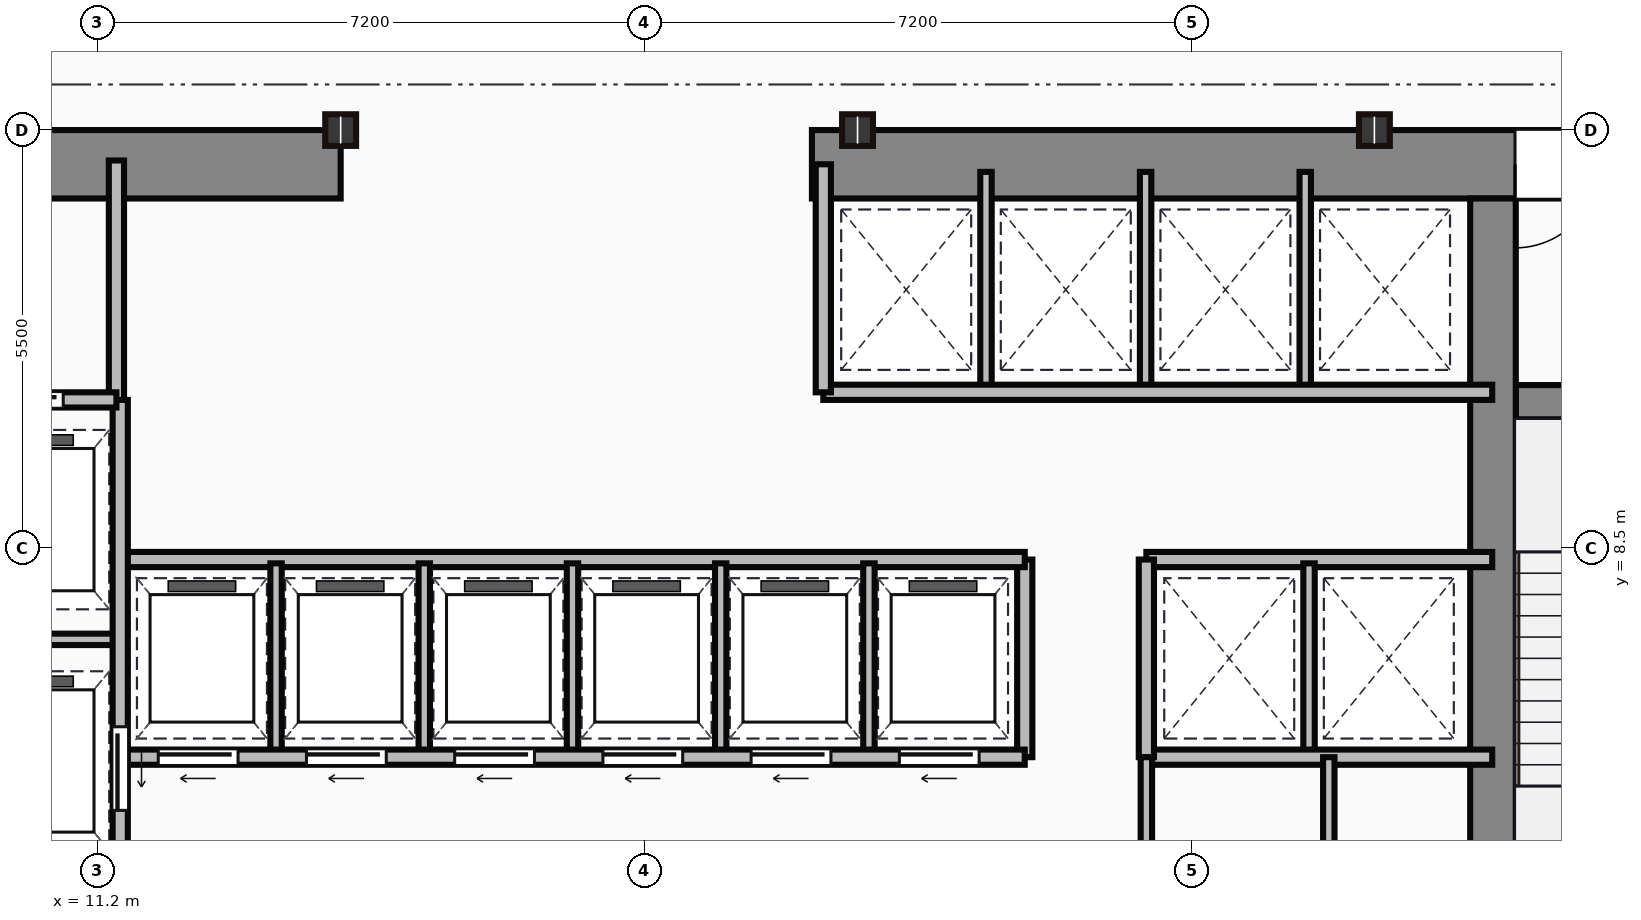
"""IFC4 building model, lengths in metres.
Left out: names, types, materials, properties, quantities, classifications, styles, units other than length and angle.
Written with IfcOpenShell. Run it as: python <this file> out.ifc"""

import sys

from ifc_helpers import new_model, si_unit, direction, frame, frame_2d, origin, origin_2d, place, context, subcontext, project, spatial, rectangle, i_section, extrude, source, transform, mapped, element, fill, save


model = new_model("IFC4")
c1 = context("Model", 3, precision=1e-05, world=origin(), true_north=direction((0.0, 1.0)))
c2 = subcontext(c1, "Body", "Model", "MODEL_VIEW")
j1 = project(units=[si_unit("LENGTHUNIT", "METRE"), si_unit("PLANEANGLEUNIT", "RADIAN")], contexts=[c1])
p1 = place(None, origin())
s1 = spatial("IfcSite", under=j1, at=p1, CompositionType="ELEMENT")
p2 = place(p1, origin())
s2 = spatial("IfcBuilding", under=s1, at=p2, CompositionType="ELEMENT")
p3 = place(p2, frame((0.0, 0.0, 79.95)))
s3 = spatial("IfcBuildingStorey", under=s2, at=p3, CompositionType="ELEMENT", Elevation=79.95)
m1 = source(origin(), c2, "Body", "SweptSolid", [
    extrude(rectangle(XDim=9.1, YDim=0.9, at=frame_2d((4.55, 0.0))), origin(), (0.0, 0.0, 1.0), 4.2),
])
p4 = place(p3, frame((5.3, 13.55, 0.0), z_axis=(0.0, 0.0, 1.0), x_axis=(1.0, 0.0, 0.0)))
e1 = element("IfcWall", 1, at=p4, inside=s3, PredefinedType="SHEAR", context=c2, shape_type="MappedRepresentation", body=[
    mapped(m1, transform((0.0, 0.0, 0.0))),
])
p5 = place(p4, frame((4.1, 0.0, 0.0)))
e2 = element("IfcOpeningElement", 2, at=p5, cuts=e1, PredefinedType="OPENING", context=c2, shape_type="SweptSolid", body=[
    extrude(rectangle(XDim=1.1, YDim=2.15, at=frame_2d((0.55, 1.075))), frame((0.0, 0.46, 0.0), z_axis=(0.0, -1.0, 0.0), x_axis=(1.0, 0.0, 0.0)), (0.0, 0.0, 1.0), 0.92),
])
m2 = source(origin(), c2, "Body", "SweptSolid", [
    extrude(rectangle(XDim=12.6, YDim=0.9, at=frame_2d((6.3, 0.0))), origin(), (0.0, 0.0, 1.0), 4.2),
])
p6 = place(p3, frame((20.6, 13.55, 0.0), z_axis=(0.0, 0.0, 1.0), x_axis=(1.0, 0.0, 0.0)))
e3 = element("IfcWall", 3, at=p6, inside=s3, PredefinedType="SHEAR", context=c2, shape_type="MappedRepresentation", body=[
    mapped(m2, transform((0.0, 0.0, 0.0))),
])
p7 = place(p6, frame((9.25, 0.0, 0.0)))
e4 = element("IfcOpeningElement", 4, at=p7, cuts=e3, PredefinedType="OPENING", context=c2, shape_type="SweptSolid", body=[
    extrude(rectangle(XDim=1.1, YDim=2.15, at=frame_2d((0.55, 1.075))), frame((0.0, 0.46, 0.0), z_axis=(0.0, -1.0, 0.0), x_axis=(1.0, 0.0, 0.0)), (0.0, 0.0, 1.0), 0.92),
])
m3 = source(origin(), c2, "Body", "SweptSolid", [
    extrude(rectangle(XDim=12.2, YDim=0.6, at=frame_2d((6.1, 0.0))), origin(), (0.0, 0.0, 1.0), 4.2),
])
p8 = place(p3, frame((29.56, 0.9, 0.0), z_axis=(0.0, 0.0, 1.0), x_axis=(0.0, 1.0, 0.0)))
e5 = element("IfcWall", 5, at=p8, inside=s3, PredefinedType="SHEAR", context=c2, shape_type="MappedRepresentation", body=[
    mapped(m3, transform((0.0, 0.0, 0.0))),
])
m4 = source(origin(), c2, "Body", "SweptSolid", [
    extrude(rectangle(XDim=3.39, YDim=0.45, at=frame_2d((1.695, 0.0))), origin(), (0.0, 0.0, 1.0), 4.2),
])
p9 = place(p3, frame((29.86, 10.42, 0.0), z_axis=(0.0, 0.0, 1.0), x_axis=(1.0, 0.0, 0.0)))
e6 = element("IfcWall", 6, at=p9, inside=s3, PredefinedType="SHEAR", context=c2, shape_type="MappedRepresentation", body=[
    mapped(m4, transform((0.0, 0.0, 0.0))),
])
p10 = place(p9, frame((1.1, 0.0, 0.0)))
e7 = element("IfcOpeningElement", 7, at=p10, cuts=e6, PredefinedType="OPENING", context=c2, shape_type="SweptSolid", body=[
    extrude(rectangle(XDim=1.1, YDim=2.15, at=frame_2d((0.55, 1.075))), frame((0.0, 0.235, 0.0), z_axis=(0.0, -1.0, 0.0), x_axis=(1.0, 0.0, 0.0)), (0.0, 0.0, 1.0), 0.47),
])
m5 = source(origin(), c2, "Body", "SweptSolid", [
    extrude(i_section(OverallWidth=0.406, OverallDepth=0.416, WebThickness=0.03, FlangeThickness=0.048, at=origin_2d()), origin(), (0.0, 0.0, 1.0), 4.2),
])
for number, where, z_axis, x_axis in (
    (8, (14.4, 14.0, 0.0), (0.0, 0.0, 1.0), (1.0, 0.0, 0.0)),
    (9, (21.2, 14.0, 0.0), (0.0, 0.0, 1.0), (1.0, 0.0, 0.0)),
    (10, (28.0, 14.0, 0.0), (0.0, 0.0, 1.0), (1.0, 0.0, 0.0)),
):
    element("IfcColumn", number, at=place(p3, frame(where, z_axis=z_axis, x_axis=x_axis)), inside=s3, PredefinedType="COLUMN", context=c2, shape_type="MappedRepresentation", body=[
        mapped(m5, transform((0.0, 0.0, 0.0))),
    ])
m6 = source(origin(), c2, "Body", "SweptSolid", [
    extrude(rectangle(XDim=3.18, YDim=0.2, at=frame_2d((1.59, 0.0))), origin(), (0.0, 0.0, 1.0), 3.9),
])
p11 = place(p3, frame((11.45, 10.42, 0.0), z_axis=(0.0, 0.0, 1.0), x_axis=(0.0, 1.0, 0.0)))
e11 = element("IfcWall", 11, at=p11, inside=s3, PredefinedType="PARTITIONING", context=c2, shape_type="MappedRepresentation", body=[
    mapped(m6, transform((0.0, 0.0, 0.0))),
])
m7 = source(origin(), c2, "Body", "SweptSolid", [
    extrude(rectangle(XDim=2.35, YDim=0.2, at=frame_2d((1.175, 0.0))), origin(), (0.0, 0.0, 1.0), 3.9),
])
p12 = place(p3, frame((9.1, 10.45, 0.0), z_axis=(0.0, 0.0, 1.0), x_axis=(1.0, 0.0, 0.0)))
e12 = element("IfcWall", 12, at=p12, inside=s3, PredefinedType="PARTITIONING", context=c2, shape_type="MappedRepresentation", body=[
    mapped(m7, transform((0.0, 0.0, 0.0))),
])
p13 = place(p12, frame((0.55, 0.0, 0.0)))
e13 = element("IfcOpeningElement", 13, at=p13, cuts=e12, PredefinedType="OPENING", context=c2, shape_type="SweptSolid", body=[
    extrude(rectangle(XDim=1.1, YDim=2.15, at=frame_2d((0.55, 1.075))), frame((0.0, 0.11, 0.0), z_axis=(0.0, -1.0, 0.0), x_axis=(1.0, 0.0, 0.0)), (0.0, 0.0, 1.0), 0.22),
])
m8 = source(origin(), c2, "Body", "SweptSolid", [
    extrude(rectangle(XDim=9.6, YDim=0.2, at=frame_2d((4.8, 0.0))), origin(), (0.0, 0.0, 1.0), 3.9),
])
p14 = place(p3, frame((11.5, 0.85, 0.0), z_axis=(0.0, 0.0, 1.0), x_axis=(0.0, 1.0, 0.0)))
e14 = element("IfcWall", 14, at=p14, inside=s3, PredefinedType="PARTITIONING", context=c2, shape_type="MappedRepresentation", body=[
    mapped(m8, transform((0.0, 0.0, 0.0))),
])
p15 = place(p14, frame((4.2, 0.0, 0.0)))
e15 = element("IfcOpeningElement", 15, at=p15, cuts=e14, PredefinedType="OPENING", context=c2, shape_type="SweptSolid", body=[
    extrude(rectangle(XDim=1.1, YDim=2.15, at=frame_2d((0.55, 1.075))), frame((0.0, 0.11, 0.0), z_axis=(0.0, -1.0, 0.0), x_axis=(1.0, 0.0, 0.0)), (0.0, 0.0, 1.0), 0.22),
])
p16 = place(p14, frame((0.9, 0.0, 0.0)))
e16 = element("IfcOpeningElement", 16, at=p16, cuts=e14, PredefinedType="OPENING", context=c2, shape_type="SweptSolid", body=[
    extrude(rectangle(XDim=1.2, YDim=2.15, at=frame_2d((0.6, 1.075))), frame((0.0, 0.11, 0.0), z_axis=(0.0, -1.0, 0.0), x_axis=(1.0, 0.0, 0.0)), (0.0, 0.0, 1.0), 0.22),
])
m9 = source(origin(), c2, "Body", "SweptSolid", [
    extrude(rectangle(XDim=2.4, YDim=0.15, at=frame_2d((1.2, 0.0))), origin(), (0.0, 0.0, 1.0), 3.9),
])
p17 = place(p3, frame((9.1, 7.3, 0.0), z_axis=(0.0, 0.0, 1.0), x_axis=(1.0, 0.0, 0.0)))
e17 = element("IfcWall", 17, at=p17, inside=s3, PredefinedType="PARTITIONING", context=c2, shape_type="MappedRepresentation", body=[
    mapped(m9, transform((0.0, 0.0, 0.0))),
])
m10 = source(origin(), c2, "Body", "SweptSolid", [
    extrude(rectangle(XDim=11.85, YDim=0.2, at=frame_2d((5.925, 0.0))), origin(), (0.0, 0.0, 1.0), 3.9),
])
p18 = place(p3, frame((11.55, 5.75, 0.0), z_axis=(0.0, 0.0, 1.0), x_axis=(1.0, 0.0, 0.0)))
e18 = element("IfcWall", 18, at=p18, inside=s3, PredefinedType="PARTITIONING", context=c2, shape_type="MappedRepresentation", body=[
    mapped(m10, transform((0.0, 0.0, 0.0))),
])
p19 = place(p18, frame((0.45, 0.0, 0.0)))
e19 = element("IfcOpeningElement", 19, at=p19, cuts=e18, PredefinedType="OPENING", context=c2, shape_type="SweptSolid", body=[
    extrude(rectangle(XDim=1.05, YDim=2.15, at=frame_2d((0.525, 1.075))), frame((0.0, 0.11, 0.0), z_axis=(0.0, -1.0, 0.0), x_axis=(1.0, 0.0, 0.0)), (0.0, 0.0, 1.0), 0.22),
])
p20 = place(p18, frame((2.4, 0.0, 0.0)))
e20 = element("IfcOpeningElement", 20, at=p20, cuts=e18, PredefinedType="OPENING", context=c2, shape_type="SweptSolid", body=[
    extrude(rectangle(XDim=1.05, YDim=2.15, at=frame_2d((0.525, 1.075))), frame((0.0, 0.11, 0.0), z_axis=(0.0, -1.0, 0.0), x_axis=(1.0, 0.0, 0.0)), (0.0, 0.0, 1.0), 0.22),
])
p21 = place(p18, frame((4.35, 0.0, 0.0)))
e21 = element("IfcOpeningElement", 21, at=p21, cuts=e18, PredefinedType="OPENING", context=c2, shape_type="SweptSolid", body=[
    extrude(rectangle(XDim=1.05, YDim=2.15, at=frame_2d((0.525, 1.075))), frame((0.0, 0.11, 0.0), z_axis=(0.0, -1.0, 0.0), x_axis=(1.0, 0.0, 0.0)), (0.0, 0.0, 1.0), 0.22),
])
p22 = place(p18, frame((6.3, 0.0, 0.0)))
e22 = element("IfcOpeningElement", 22, at=p22, cuts=e18, PredefinedType="OPENING", context=c2, shape_type="SweptSolid", body=[
    extrude(rectangle(XDim=1.05, YDim=2.15, at=frame_2d((0.525, 1.075))), frame((0.0, 0.11, 0.0), z_axis=(0.0, -1.0, 0.0), x_axis=(1.0, 0.0, 0.0)), (0.0, 0.0, 1.0), 0.22),
])
p23 = place(p18, frame((8.25, 0.0, 0.0)))
e23 = element("IfcOpeningElement", 23, at=p23, cuts=e18, PredefinedType="OPENING", context=c2, shape_type="SweptSolid", body=[
    extrude(rectangle(XDim=1.05, YDim=2.15, at=frame_2d((0.525, 1.075))), frame((0.0, 0.11, 0.0), z_axis=(0.0, -1.0, 0.0), x_axis=(1.0, 0.0, 0.0)), (0.0, 0.0, 1.0), 0.22),
])
p24 = place(p18, frame((10.2, 0.0, 0.0)))
e24 = element("IfcOpeningElement", 24, at=p24, cuts=e18, PredefinedType="OPENING", context=c2, shape_type="SweptSolid", body=[
    extrude(rectangle(XDim=1.05, YDim=2.15, at=frame_2d((0.525, 1.075))), frame((0.0, 0.11, 0.0), z_axis=(0.0, -1.0, 0.0), x_axis=(1.0, 0.0, 0.0)), (0.0, 0.0, 1.0), 0.22),
])
p25 = place(p3, frame((11.55, 8.35, 0.0), z_axis=(0.0, 0.0, 1.0), x_axis=(1.0, 0.0, 0.0)))
e25 = element("IfcWall", 25, at=p25, inside=s3, PredefinedType="PARTITIONING", context=c2, shape_type="MappedRepresentation", body=[
    mapped(m10, transform((0.0, 0.0, 0.0))),
])
m11 = source(origin(), c2, "Body", "SweptSolid", [
    extrude(rectangle(XDim=2.6, YDim=0.2, at=frame_2d((1.3, 0.0))), origin(), (0.0, 0.0, 1.0), 3.9),
])
p26 = place(p3, frame((23.4, 5.75, 0.0), z_axis=(0.0, 0.0, 1.0), x_axis=(0.0, 1.0, 0.0)))
e26 = element("IfcWall", 26, at=p26, inside=s3, PredefinedType="PARTITIONING", context=c2, shape_type="MappedRepresentation", body=[
    mapped(m11, transform((0.0, 0.0, 0.0))),
])
m12 = source(origin(), c2, "Body", "SweptSolid", [
    extrude(rectangle(XDim=2.5, YDim=0.15, at=frame_2d((1.25, 0.0))), origin(), (0.0, 0.0, 1.0), 3.9),
])
for number, where, z_axis, x_axis in (
    (27, (13.55, 5.8, 0.0), (0.0, 0.0, 1.0), (0.0, 1.0, 0.0)),
    (28, (15.5, 5.8, 0.0), (0.0, 0.0, 1.0), (0.0, 1.0, 0.0)),
    (29, (17.45, 5.8, 0.0), (0.0, 0.0, 1.0), (0.0, 1.0, 0.0)),
    (30, (19.4, 5.8, 0.0), (0.0, 0.0, 1.0), (0.0, 1.0, 0.0)),
    (31, (21.35, 5.8, 0.0), (0.0, 0.0, 1.0), (0.0, 1.0, 0.0)),
):
    element("IfcWall", number, at=place(p3, frame(where, z_axis=z_axis, x_axis=x_axis)), inside=s3, PredefinedType="PARTITIONING", context=c2, shape_type="MappedRepresentation", body=[
        mapped(m12, transform((0.0, 0.0, 0.0))),
    ])
m13 = source(origin(), c2, "Body", "SweptSolid", [
    extrude(rectangle(XDim=8.8, YDim=0.2, at=frame_2d((4.4, 0.0))), origin(), (0.0, 0.0, 1.0), 3.9),
])
p27 = place(p3, frame((20.75, 10.55, 0.0), z_axis=(0.0, 0.0, 1.0), x_axis=(1.0, 0.0, 0.0)))
e32 = element("IfcWall", 32, at=p27, inside=s3, PredefinedType="PARTITIONING", context=c2, shape_type="MappedRepresentation", body=[
    mapped(m13, transform((0.0, 0.0, 0.0))),
])
m14 = source(origin(), c2, "Body", "SweptSolid", [
    extrude(rectangle(XDim=3.0, YDim=0.2, at=frame_2d((1.5, 0.0))), origin(), (0.0, 0.0, 1.0), 3.9),
])
p28 = place(p3, frame((20.75, 10.55, 0.0), z_axis=(0.0, 0.0, 1.0), x_axis=(0.0, 1.0, 0.0)))
e33 = element("IfcWall", 33, at=p28, inside=s3, PredefinedType="PARTITIONING", context=c2, shape_type="MappedRepresentation", body=[
    mapped(m14, transform((0.0, 0.0, 0.0))),
])
m15 = source(origin(), c2, "Body", "SweptSolid", [
    extrude(rectangle(XDim=2.85, YDim=0.15, at=frame_2d((1.425, 0.0))), origin(), (0.0, 0.0, 1.0), 3.9),
])
for number, where, z_axis, x_axis in (
    (34, (22.89, 10.6, 0.0), (0.0, 0.0, 1.0), (0.0, 1.0, 0.0)),
    (35, (24.99, 10.6, 0.0), (0.0, 0.0, 1.0), (0.0, 1.0, 0.0)),
    (36, (27.09, 10.6, 0.0), (0.0, 0.0, 1.0), (0.0, 1.0, 0.0)),
):
    element("IfcWall", number, at=place(p3, frame(where, z_axis=z_axis, x_axis=x_axis)), inside=s3, PredefinedType="PARTITIONING", context=c2, shape_type="MappedRepresentation", body=[
        mapped(m15, transform((0.0, 0.0, 0.0))),
    ])
m16 = source(origin(), c2, "Body", "SweptSolid", [
    extrude(rectangle(XDim=4.55, YDim=0.2, at=frame_2d((2.275, 0.0))), origin(), (0.0, 0.0, 1.0), 3.9),
])
for number, where, z_axis, x_axis in (
    (37, (25.0, 8.35, 0.0), (0.0, 0.0, 1.0), (1.0, 0.0, 0.0)),
    (38, (25.0, 5.75, 0.0), (0.0, 0.0, 1.0), (1.0, 0.0, 0.0)),
):
    element("IfcWall", number, at=place(p3, frame(where, z_axis=z_axis, x_axis=x_axis)), inside=s3, PredefinedType="PARTITIONING", context=c2, shape_type="MappedRepresentation", body=[
        mapped(m16, transform((0.0, 0.0, 0.0))),
    ])
p29 = place(p3, frame((25.0, 5.75, 0.0), z_axis=(0.0, 0.0, 1.0), x_axis=(0.0, 1.0, 0.0)))
e39 = element("IfcWall", 39, at=p29, inside=s3, PredefinedType="PARTITIONING", context=c2, shape_type="MappedRepresentation", body=[
    mapped(m11, transform((0.0, 0.0, 0.0))),
])
p30 = place(p3, frame((27.14, 5.8, 0.0), z_axis=(0.0, 0.0, 1.0), x_axis=(0.0, 1.0, 0.0)))
e40 = element("IfcWall", 40, at=p30, inside=s3, PredefinedType="PARTITIONING", context=c2, shape_type="MappedRepresentation", body=[
    mapped(m12, transform((0.0, 0.0, 0.0))),
])
m17 = source(origin(), c2, "Body", "SweptSolid", [
    extrude(rectangle(XDim=4.9, YDim=0.15, at=frame_2d((2.45, 0.0))), origin(), (0.0, 0.0, 1.0), 3.9),
])
p31 = place(p3, frame((25.0, 0.85, 0.0), z_axis=(0.0, 0.0, 1.0), x_axis=(0.0, 1.0, 0.0)))
e41 = element("IfcWall", 41, at=p31, inside=s3, PredefinedType="PARTITIONING", context=c2, shape_type="MappedRepresentation", body=[
    mapped(m17, transform((0.0, 0.0, 0.0))),
])
p32 = place(p31, frame((2.5, 0.0, 0.0)))
e42 = element("IfcOpeningElement", 42, at=p32, cuts=e41, PredefinedType="OPENING", context=c2, shape_type="SweptSolid", body=[
    extrude(rectangle(XDim=0.95, YDim=2.15, at=frame_2d((0.475, 1.075))), frame((0.0, 0.085, 0.0), z_axis=(0.0, -1.0, 0.0), x_axis=(1.0, 0.0, 0.0)), (0.0, 0.0, 1.0), 0.17),
])
m18 = source(origin(), c2, "Body", "SweptSolid", [
    extrude(rectangle(XDim=3.4, YDim=0.15, at=frame_2d((1.7, 0.0))), origin(), (0.0, 0.0, 1.0), 3.9),
])
p33 = place(p3, frame((27.4, 2.35, 0.0), z_axis=(0.0, 0.0, 1.0), x_axis=(0.0, 1.0, 0.0)))
e43 = element("IfcWall", 43, at=p33, inside=s3, PredefinedType="PARTITIONING", context=c2, shape_type="MappedRepresentation", body=[
    mapped(m18, transform((0.0, 0.0, 0.0))),
])
p34 = place(p33, frame((1.1, 0.0, 0.0)))
e44 = element("IfcOpeningElement", 44, at=p34, cuts=e43, PredefinedType="OPENING", context=c2, shape_type="SweptSolid", body=[
    extrude(rectangle(XDim=0.85, YDim=2.1, at=frame_2d((0.425, 1.05))), frame((0.0, 0.085, 0.0), z_axis=(0.0, -1.0, 0.0), x_axis=(1.0, 0.0, 0.0)), (0.0, 0.0, 1.0), 0.17),
])
m19 = source(origin(), c2, "Body", "SweptSolid", [
    extrude(rectangle(XDim=1.1, YDim=2.15, at=frame_2d((0.55, 1.075))), frame((0.0, 0.025, 0.0), z_axis=(0.0, -1.0, 0.0), x_axis=(1.0, 0.0, 0.0)), (0.0, 0.0, 1.0), 0.05),
])
p35 = place(p7, origin())
e45 = element("IfcDoor", 45, at=p35, inside=s3, OperationType="SINGLE_SWING_LEFT", PredefinedType="DOOR", context=c2, shape_type="MappedRepresentation", body=[
    mapped(m19, transform((0.0, 0.0, 0.0))),
])
fill(e4, e45)
p36 = place(p13, origin())
e46 = element("IfcDoor", 46, at=p36, inside=s3, OperationType="SLIDING_TO_LEFT", PredefinedType="DOOR", context=c2, shape_type="MappedRepresentation", body=[
    mapped(m19, transform((0.0, 0.0, 0.0))),
])
fill(e13, e46)
p37 = place(p15, frame((1.1, 0.0, 0.0), z_axis=(0.0, 0.0, 1.0), x_axis=(-1.0, 0.0, 0.0)))
e47 = element("IfcDoor", 47, at=p37, inside=s3, OperationType="SLIDING_TO_LEFT", PredefinedType="DOOR", context=c2, shape_type="MappedRepresentation", body=[
    mapped(m19, transform((0.0, 0.0, 0.0))),
])
fill(e15, e47)
m20 = source(origin(), c2, "Body", "SweptSolid", [
    extrude(rectangle(XDim=1.05, YDim=2.15, at=frame_2d((0.525, 1.075))), frame((0.0, 0.025, 0.0), z_axis=(0.0, -1.0, 0.0), x_axis=(1.0, 0.0, 0.0)), (0.0, 0.0, 1.0), 0.05),
])
p38 = place(p19, frame((1.05, 0.0, 0.0), z_axis=(0.0, 0.0, 1.0), x_axis=(-1.0, 0.0, 0.0)))
e48 = element("IfcDoor", 48, at=p38, inside=s3, OperationType="SLIDING_TO_LEFT", PredefinedType="DOOR", context=c2, shape_type="MappedRepresentation", body=[
    mapped(m20, transform((0.0, 0.0, 0.0))),
])
fill(e19, e48)
p39 = place(p20, frame((1.05, 0.0, 0.0), z_axis=(0.0, 0.0, 1.0), x_axis=(-1.0, 0.0, 0.0)))
e49 = element("IfcDoor", 49, at=p39, inside=s3, OperationType="SLIDING_TO_LEFT", PredefinedType="DOOR", context=c2, shape_type="MappedRepresentation", body=[
    mapped(m20, transform((0.0, 0.0, 0.0))),
])
fill(e20, e49)
p40 = place(p21, frame((1.05, 0.0, 0.0), z_axis=(0.0, 0.0, 1.0), x_axis=(-1.0, 0.0, 0.0)))
e50 = element("IfcDoor", 50, at=p40, inside=s3, OperationType="SLIDING_TO_LEFT", PredefinedType="DOOR", context=c2, shape_type="MappedRepresentation", body=[
    mapped(m20, transform((0.0, 0.0, 0.0))),
])
fill(e21, e50)
p41 = place(p22, frame((1.05, 0.0, 0.0), z_axis=(0.0, 0.0, 1.0), x_axis=(-1.0, 0.0, 0.0)))
e51 = element("IfcDoor", 51, at=p41, inside=s3, OperationType="SLIDING_TO_LEFT", PredefinedType="DOOR", context=c2, shape_type="MappedRepresentation", body=[
    mapped(m20, transform((0.0, 0.0, 0.0))),
])
fill(e22, e51)
p42 = place(p23, frame((1.05, 0.0, 0.0), z_axis=(0.0, 0.0, 1.0), x_axis=(-1.0, 0.0, 0.0)))
e52 = element("IfcDoor", 52, at=p42, inside=s3, OperationType="SLIDING_TO_LEFT", PredefinedType="DOOR", context=c2, shape_type="MappedRepresentation", body=[
    mapped(m20, transform((0.0, 0.0, 0.0))),
])
fill(e23, e52)
p43 = place(p24, frame((1.05, 0.0, 0.0), z_axis=(0.0, 0.0, 1.0), x_axis=(-1.0, 0.0, 0.0)))
e53 = element("IfcDoor", 53, at=p43, inside=s3, OperationType="SLIDING_TO_LEFT", PredefinedType="DOOR", context=c2, shape_type="MappedRepresentation", body=[
    mapped(m20, transform((0.0, 0.0, 0.0))),
])
fill(e24, e53)
save(model, sys.argv[1])
